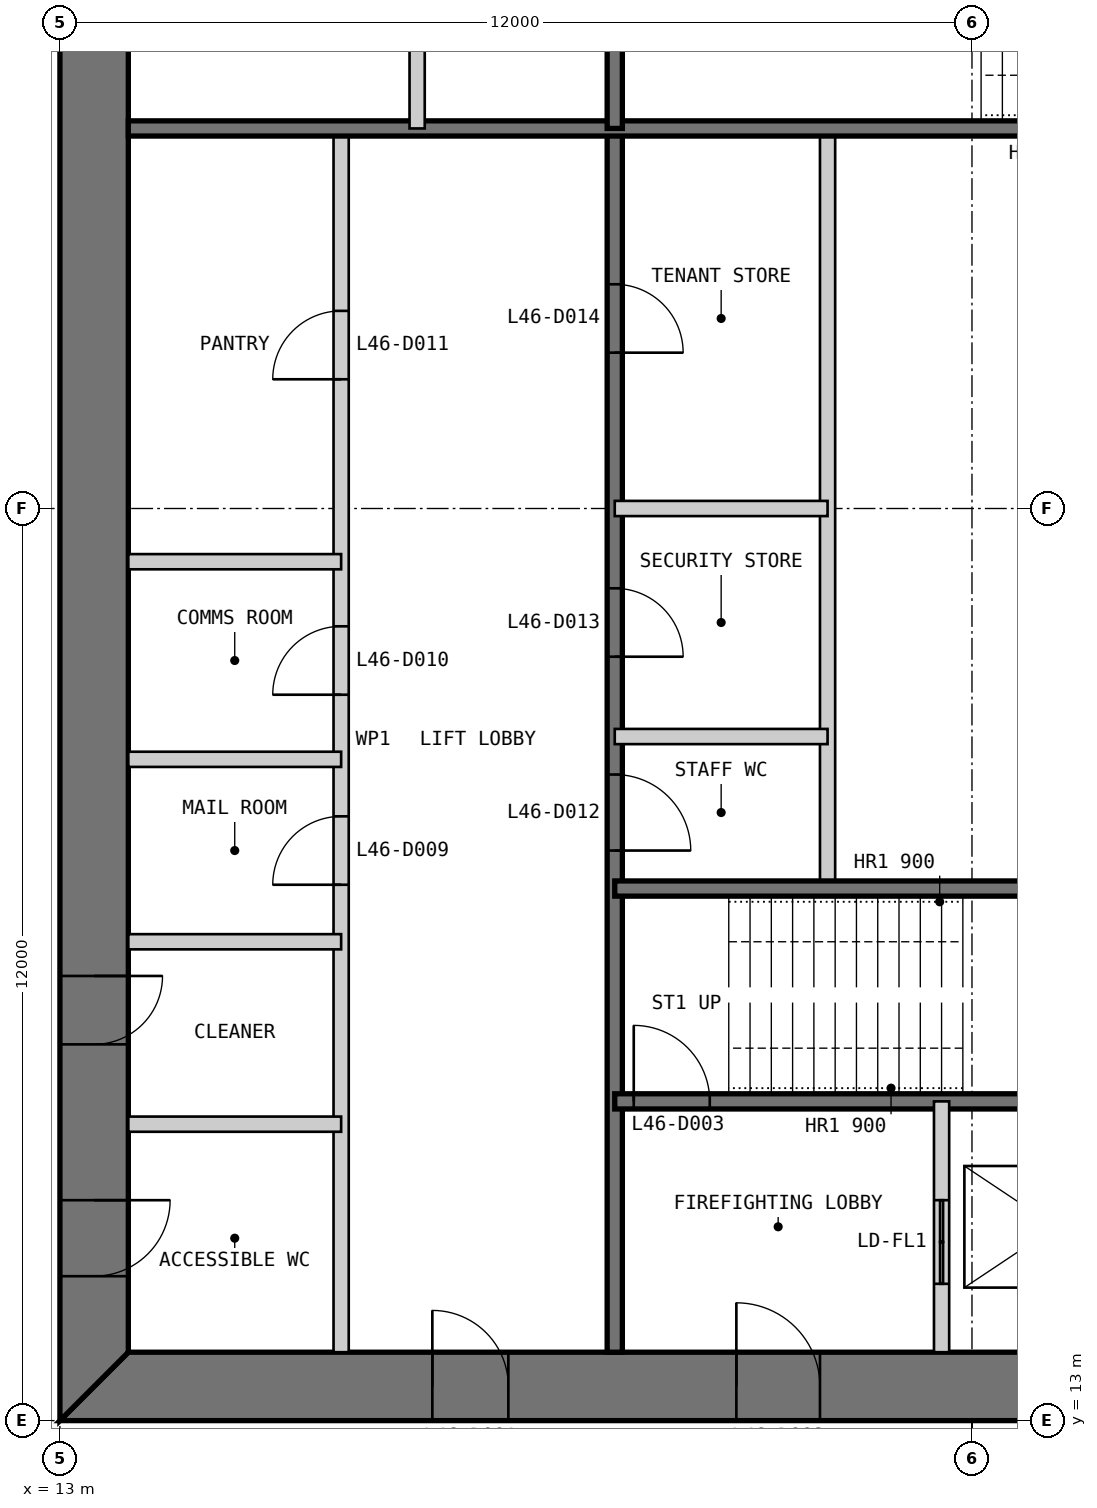
"""IFC4 building model, lengths in metres.
Left out: names, types, materials, properties, quantities, classifications, styles, units other than length and angle.
Written with IfcOpenShell. Run it as: python <this file> out.ifc"""

import sys

from ifc_helpers import new_model, si_unit, direction, frame, frame_2d, origin, place, context, subcontext, project, spatial, polyline, rectangle, outline, extrude, element, fill, save


model = new_model("IFC4")
c1 = context("Model", 3, precision=1e-05, world=origin(), true_north=direction((0.0, 1.0)))
c2 = subcontext(c1, "Body", "Model", "MODEL_VIEW")
j1 = project(units=[si_unit("LENGTHUNIT", "METRE"), si_unit("PLANEANGLEUNIT", "RADIAN")], contexts=[c1])
p1 = place(None, origin())
s1 = spatial("IfcSite", under=j1, at=p1, CompositionType="ELEMENT")
p2 = place(p1, origin())
s2 = spatial("IfcBuilding", under=s1, at=p2, CompositionType="ELEMENT")
p3 = place(p2, frame((0.0, 0.0, 197.8)))
s3 = spatial("IfcBuildingStorey", under=s2, at=p3, CompositionType="ELEMENT", Elevation=197.8)
p4 = place(p3, frame((13.0, 13.45, 0.0), z_axis=(0.0, 0.0, 1.0), x_axis=(1.0, 0.0, 0.0)))
e1 = element("IfcWall", 1, at=p4, inside=s3, PredefinedType="SHEAR", context=c2, shape_type="SweptSolid", body=[
    extrude(outline(polyline([(0.0, -0.45), (24.0, -0.45), (23.1, 0.45), (0.9, 0.45), (0.0, -0.45)])), origin(), (0.0, 0.0, 1.0), 4.0),
])
p5 = place(p4, frame((4.9, 0.0, 0.0)))
e2 = element("IfcOpeningElement", 2, at=p5, cuts=e1, PredefinedType="OPENING", context=c2, shape_type="SweptSolid", body=[
    extrude(rectangle(XDim=1.0, YDim=2.2, at=frame_2d((0.5, 1.1))), frame((0.0, 0.46, 0.0), z_axis=(0.0, -1.0, 0.0), x_axis=(1.0, 0.0, 0.0)), (0.0, 0.0, 1.0), 0.92),
])
p6 = place(p4, frame((8.9, 0.0, 0.0)))
e3 = element("IfcOpeningElement", 3, at=p6, cuts=e1, PredefinedType="OPENING", context=c2, shape_type="SweptSolid", body=[
    extrude(rectangle(XDim=1.1, YDim=2.2, at=frame_2d((0.55, 1.1))), frame((0.0, 0.46, 0.0), z_axis=(0.0, -1.0, 0.0), x_axis=(1.0, 0.0, 0.0)), (0.0, 0.0, 1.0), 0.92),
])
p7 = place(p4, frame((15.05, 0.0, 0.0)))
e4 = element("IfcOpeningElement", 4, at=p7, cuts=e1, PredefinedType="OPENING", context=c2, shape_type="SweptSolid", body=[
    extrude(rectangle(XDim=0.9, YDim=2.2, at=frame_2d((0.45, 1.1))), frame((0.0, 0.46, 0.0), z_axis=(0.0, -1.0, 0.0), x_axis=(1.0, 0.0, 0.0)), (0.0, 0.0, 1.0), 0.92),
])
p8 = place(p4, frame((17.9, 0.0, 0.0)))
e5 = element("IfcOpeningElement", 5, at=p8, cuts=e1, PredefinedType="OPENING", context=c2, shape_type="SweptSolid", body=[
    extrude(rectangle(XDim=1.0, YDim=2.2, at=frame_2d((0.5, 1.1))), frame((0.0, 0.46, 0.0), z_axis=(0.0, -1.0, 0.0), x_axis=(1.0, 0.0, 0.0)), (0.0, 0.0, 1.0), 0.92),
])
p9 = place(p4, frame((21.4, 0.0, 0.0)))
e6 = element("IfcOpeningElement", 6, at=p9, cuts=e1, PredefinedType="OPENING", context=c2, shape_type="SweptSolid", body=[
    extrude(rectangle(XDim=1.0, YDim=2.2, at=frame_2d((0.5, 1.1))), frame((0.0, 0.46, 0.0), z_axis=(0.0, -1.0, 0.0), x_axis=(1.0, 0.0, 0.0)), (0.0, 0.0, 1.0), 0.92),
])
p10 = place(p3, frame((13.45, 36.1, 0.0), z_axis=(0.0, 0.0, 1.0), x_axis=(0.0, -1.0, 0.0)))
e7 = element("IfcWall", 7, at=p10, inside=s3, PredefinedType="SHEAR", context=c2, shape_type="SweptSolid", body=[
    extrude(outline(polyline([(-0.9, -0.45), (23.1, -0.45), (22.2, 0.45), (0.0, 0.45), (-0.9, -0.45)])), origin(), (0.0, 0.0, 1.0), 4.0),
])
p11 = place(p10, frame((20.2, 0.0, 0.0)))
e8 = element("IfcOpeningElement", 8, at=p11, cuts=e7, PredefinedType="OPENING", context=c2, shape_type="SweptSolid", body=[
    extrude(rectangle(XDim=1.0, YDim=2.2, at=frame_2d((0.5, 1.1))), frame((0.0, 0.46, 0.0), z_axis=(0.0, -1.0, 0.0), x_axis=(1.0, 0.0, 0.0)), (0.0, 0.0, 1.0), 0.92),
])
p12 = place(p10, frame((17.25, 0.0, 0.0)))
e9 = element("IfcOpeningElement", 9, at=p12, cuts=e7, PredefinedType="OPENING", context=c2, shape_type="SweptSolid", body=[
    extrude(rectangle(XDim=0.9, YDim=2.2, at=frame_2d((0.45, 1.1))), frame((0.0, 0.46, 0.0), z_axis=(0.0, -1.0, 0.0), x_axis=(1.0, 0.0, 0.0)), (0.0, 0.0, 1.0), 0.92),
])
p13 = place(p3, frame((16.7, 13.9, 0.0), z_axis=(0.0, 0.0, 1.0), x_axis=(0.0, 1.0, 0.0)))
e10 = element("IfcWall", 10, at=p13, inside=s3, PredefinedType="PARTITIONING", context=c2, shape_type="SweptSolid", body=[
    extrude(rectangle(XDim=16.1, YDim=0.2, at=frame_2d((8.05, 0.0))), origin(), (0.0, 0.0, 1.0), 3.8),
])
p14 = place(p13, frame((6.15, 0.0, 0.0)))
e11 = element("IfcOpeningElement", 11, at=p14, cuts=e10, PredefinedType="OPENING", context=c2, shape_type="SweptSolid", body=[
    extrude(rectangle(XDim=0.9, YDim=2.2, at=frame_2d((0.45, 1.1))), frame((0.0, 0.11, 0.0), z_axis=(0.0, -1.0, 0.0), x_axis=(1.0, 0.0, 0.0)), (0.0, 0.0, 1.0), 0.22),
])
p15 = place(p13, frame((8.65, 0.0, 0.0)))
e12 = element("IfcOpeningElement", 12, at=p15, cuts=e10, PredefinedType="OPENING", context=c2, shape_type="SweptSolid", body=[
    extrude(rectangle(XDim=0.9, YDim=2.2, at=frame_2d((0.45, 1.1))), frame((0.0, 0.11, 0.0), z_axis=(0.0, -1.0, 0.0), x_axis=(1.0, 0.0, 0.0)), (0.0, 0.0, 1.0), 0.22),
])
p16 = place(p13, frame((12.8, 0.0, 0.0)))
e13 = element("IfcOpeningElement", 13, at=p16, cuts=e10, PredefinedType="OPENING", context=c2, shape_type="SweptSolid", body=[
    extrude(rectangle(XDim=0.9, YDim=2.2, at=frame_2d((0.45, 1.1))), frame((0.0, 0.11, 0.0), z_axis=(0.0, -1.0, 0.0), x_axis=(1.0, 0.0, 0.0)), (0.0, 0.0, 1.0), 0.22),
])
p17 = place(p3, frame((20.3, 13.9, 0.0), z_axis=(0.0, 0.0, 1.0), x_axis=(0.0, 1.0, 0.0)))
e14 = element("IfcWall", 14, at=p17, inside=s3, PredefinedType="SOLIDWALL", context=c2, shape_type="SweptSolid", body=[
    extrude(rectangle(XDim=16.1, YDim=0.2, at=frame_2d((8.05, 0.0))), origin(), (0.0, 0.0, 1.0), 3.8),
])
p18 = place(p17, frame((6.6, 0.0, 0.0)))
e15 = element("IfcOpeningElement", 15, at=p18, cuts=e14, PredefinedType="OPENING", context=c2, shape_type="SweptSolid", body=[
    extrude(rectangle(XDim=1.0, YDim=2.2, at=frame_2d((0.5, 1.1))), frame((0.0, 0.11, 0.0), z_axis=(0.0, -1.0, 0.0), x_axis=(1.0, 0.0, 0.0)), (0.0, 0.0, 1.0), 0.22),
])
p19 = place(p17, frame((9.15, 0.0, 0.0)))
e16 = element("IfcOpeningElement", 16, at=p19, cuts=e14, PredefinedType="OPENING", context=c2, shape_type="SweptSolid", body=[
    extrude(rectangle(XDim=0.9, YDim=2.2, at=frame_2d((0.45, 1.1))), frame((0.0, 0.11, 0.0), z_axis=(0.0, -1.0, 0.0), x_axis=(1.0, 0.0, 0.0)), (0.0, 0.0, 1.0), 0.22),
])
p20 = place(p17, frame((13.15, 0.0, 0.0)))
e17 = element("IfcOpeningElement", 17, at=p20, cuts=e14, PredefinedType="OPENING", context=c2, shape_type="SweptSolid", body=[
    extrude(rectangle(XDim=0.9, YDim=2.2, at=frame_2d((0.45, 1.1))), frame((0.0, 0.11, 0.0), z_axis=(0.0, -1.0, 0.0), x_axis=(1.0, 0.0, 0.0)), (0.0, 0.0, 1.0), 0.22),
])
p21 = place(p3, frame((23.1, 20.0, 0.0), z_axis=(0.0, 0.0, 1.0), x_axis=(0.0, 1.0, 0.0)))
e18 = element("IfcWall", 18, at=p21, inside=s3, PredefinedType="PARTITIONING", context=c2, shape_type="SweptSolid", body=[
    extrude(rectangle(XDim=10.0, YDim=0.2, at=frame_2d((5.0, 0.0))), origin(), (0.0, 0.0, 1.0), 3.8),
])
p22 = place(p3, frame((20.3, 17.2, 0.0), z_axis=(0.0, 0.0, 1.0), x_axis=(1.0, 0.0, 0.0)))
e19 = element("IfcWall", 19, at=p22, inside=s3, PredefinedType="SOLIDWALL", context=c2, shape_type="SweptSolid", body=[
    extrude(rectangle(XDim=9.4, YDim=0.2, at=frame_2d((4.7, 0.0))), origin(), (0.0, 0.0, 1.0), 3.8),
])
p23 = place(p22, frame((0.25, 0.0, 0.0)))
e20 = element("IfcOpeningElement", 20, at=p23, cuts=e19, PredefinedType="OPENING", context=c2, shape_type="SweptSolid", body=[
    extrude(rectangle(XDim=1.0, YDim=2.2, at=frame_2d((0.5, 1.1))), frame((0.0, 0.11, 0.0), z_axis=(0.0, -1.0, 0.0), x_axis=(1.0, 0.0, 0.0)), (0.0, 0.0, 1.0), 0.22),
])
p24 = place(p3, frame((20.3, 20.0, 0.0), z_axis=(0.0, 0.0, 1.0), x_axis=(1.0, 0.0, 0.0)))
e21 = element("IfcWall", 21, at=p24, inside=s3, PredefinedType="SOLIDWALL", context=c2, shape_type="SweptSolid", body=[
    extrude(rectangle(XDim=15.8, YDim=0.2, at=frame_2d((7.9, 0.0))), origin(), (0.0, 0.0, 1.0), 3.8),
])
p25 = place(p3, frame((24.6, 13.9, 0.0), z_axis=(0.0, 0.0, 1.0), x_axis=(0.0, 1.0, 0.0)))
e22 = element("IfcWall", 22, at=p25, inside=s3, PredefinedType="PARTITIONING", context=c2, shape_type="SweptSolid", body=[
    extrude(rectangle(XDim=3.3, YDim=0.2, at=frame_2d((1.65, 0.0))), origin(), (0.0, 0.0, 1.0), 3.8),
])
p26 = place(p25, frame((0.9, 0.0, 0.0)))
e23 = element("IfcOpeningElement", 23, at=p26, cuts=e22, PredefinedType="OPENING", context=c2, shape_type="SweptSolid", body=[
    extrude(rectangle(XDim=1.1, YDim=2.2, at=frame_2d((0.55, 1.1))), frame((0.0, 0.11, 0.0), z_axis=(0.0, -1.0, 0.0), x_axis=(1.0, 0.0, 0.0)), (0.0, 0.0, 1.0), 0.22),
])
for number, where, z_axis, x_axis in (
    (24, (13.9, 16.9, 0.0), (0.0, 0.0, 1.0), (1.0, 0.0, 0.0)),
    (25, (13.9, 19.3, 0.0), (0.0, 0.0, 1.0), (1.0, 0.0, 0.0)),
    (26, (13.9, 21.7, 0.0), (0.0, 0.0, 1.0), (1.0, 0.0, 0.0)),
    (27, (13.9, 24.3, 0.0), (0.0, 0.0, 1.0), (1.0, 0.0, 0.0)),
    (28, (20.3, 22.0, 0.0), (0.0, 0.0, 1.0), (1.0, 0.0, 0.0)),
    (29, (20.3, 25.0, 0.0), (0.0, 0.0, 1.0), (1.0, 0.0, 0.0)),
):
    element("IfcWall", number, at=place(p3, frame(where, z_axis=z_axis, x_axis=x_axis)), inside=s3, PredefinedType="PARTITIONING", context=c2, shape_type="SweptSolid", body=[
        extrude(rectangle(XDim=2.8, YDim=0.2, at=frame_2d((1.4, 0.0))), origin(), (0.0, 0.0, 1.0), 3.8),
    ])
p27 = place(p3, frame((29.7, 30.0, 0.0), z_axis=(0.0, 0.0, 1.0), x_axis=(-1.0, 0.0, 0.0)))
e30 = element("IfcWall", 30, at=p27, inside=s3, PredefinedType="SOLIDWALL", context=c2, shape_type="SweptSolid", body=[
    extrude(rectangle(XDim=15.8, YDim=0.2, at=frame_2d((7.9, 0.0))), origin(), (0.0, 0.0, 1.0), 3.8),
])
p28 = place(p3, frame((20.3, 36.1, 0.0), z_axis=(0.0, 0.0, 1.0), x_axis=(0.0, -1.0, 0.0)))
e31 = element("IfcWall", 31, at=p28, inside=s3, PredefinedType="SOLIDWALL", context=c2, shape_type="SweptSolid", body=[
    extrude(rectangle(XDim=6.1, YDim=0.2, at=frame_2d((3.05, 0.0))), origin(), (0.0, 0.0, 1.0), 3.8),
])
p29 = place(p3, frame((17.7, 36.1, 0.0), z_axis=(0.0, 0.0, 1.0), x_axis=(0.0, -1.0, 0.0)))
e32 = element("IfcWall", 32, at=p29, inside=s3, PredefinedType="PARTITIONING", context=c2, shape_type="SweptSolid", body=[
    extrude(rectangle(XDim=6.1, YDim=0.2, at=frame_2d((3.05, 0.0))), origin(), (0.0, 0.0, 1.0), 3.8),
])
p30 = place(p5, origin())
e33 = element("IfcDoor", 33, at=p30, inside=s3, OperationType="SINGLE_SWING_LEFT", PredefinedType="DOOR", context=c2, shape_type="SweptSolid", body=[
    extrude(rectangle(XDim=1.0, YDim=2.2, at=frame_2d((0.5, 1.1))), frame((0.0, 0.025, 0.0), z_axis=(0.0, -1.0, 0.0), x_axis=(1.0, 0.0, 0.0)), (0.0, 0.0, 1.0), 0.05),
    extrude(outline(polyline([(0.0, 0.0), (0.04, 0.0), (0.04, 2.16), (0.96, 2.16), (0.96, 0.0), (1.0, 0.0), (1.0, 2.2), (0.0, 2.2), (0.0, 0.0)])), frame((0.0, 0.3, 0.0), z_axis=(0.0, -1.0, 0.0), x_axis=(1.0, 0.0, 0.0)), (0.0, 0.0, 1.0), 0.6),
])
fill(e2, e33)
p31 = place(p6, origin())
e34 = element("IfcDoor", 34, at=p31, inside=s3, OperationType="SINGLE_SWING_LEFT", PredefinedType="DOOR", context=c2, shape_type="SweptSolid", body=[
    extrude(rectangle(XDim=1.1, YDim=2.2, at=frame_2d((0.55, 1.1))), frame((0.0, 0.025, 0.0), z_axis=(0.0, -1.0, 0.0), x_axis=(1.0, 0.0, 0.0)), (0.0, 0.0, 1.0), 0.05),
    extrude(outline(polyline([(0.0, 0.0), (0.04, 0.0), (0.04, 2.16), (1.06, 2.16), (1.06, 0.0), (1.1, 0.0), (1.1, 2.2), (0.0, 2.2), (0.0, 0.0)])), frame((0.0, 0.3, 0.0), z_axis=(0.0, -1.0, 0.0), x_axis=(1.0, 0.0, 0.0)), (0.0, 0.0, 1.0), 0.6),
])
fill(e3, e34)
p32 = place(p23, origin())
e35 = element("IfcDoor", 35, at=p32, inside=s3, OperationType="SINGLE_SWING_LEFT", PredefinedType="DOOR", context=c2, shape_type="SweptSolid", body=[
    extrude(rectangle(XDim=1.0, YDim=2.2, at=frame_2d((0.5, 1.1))), frame((0.0, 0.025, 0.0), z_axis=(0.0, -1.0, 0.0), x_axis=(1.0, 0.0, 0.0)), (0.0, 0.0, 1.0), 0.05),
])
fill(e20, e35)
p33 = place(p11, origin())
e36 = element("IfcDoor", 36, at=p33, inside=s3, OperationType="SINGLE_SWING_LEFT", PredefinedType="DOOR", context=c2, shape_type="SweptSolid", body=[
    extrude(rectangle(XDim=1.0, YDim=2.2, at=frame_2d((0.5, 1.1))), frame((0.0, 0.025, 0.0), z_axis=(0.0, -1.0, 0.0), x_axis=(1.0, 0.0, 0.0)), (0.0, 0.0, 1.0), 0.05),
    extrude(outline(polyline([(0.0, 0.0), (0.04, 0.0), (0.04, 2.16), (0.96, 2.16), (0.96, 0.0), (1.0, 0.0), (1.0, 2.2), (0.0, 2.2), (0.0, 0.0)])), frame((0.0, 0.3, 0.0), z_axis=(0.0, -1.0, 0.0), x_axis=(1.0, 0.0, 0.0)), (0.0, 0.0, 1.0), 0.6),
])
fill(e8, e36)
p34 = place(p12, origin())
e37 = element("IfcDoor", 37, at=p34, inside=s3, OperationType="SINGLE_SWING_LEFT", PredefinedType="DOOR", context=c2, shape_type="SweptSolid", body=[
    extrude(rectangle(XDim=0.9, YDim=2.2, at=frame_2d((0.45, 1.1))), frame((0.0, 0.025, 0.0), z_axis=(0.0, -1.0, 0.0), x_axis=(1.0, 0.0, 0.0)), (0.0, 0.0, 1.0), 0.05),
    extrude(outline(polyline([(0.0, 0.0), (0.04, 0.0), (0.04, 2.16), (0.86, 2.16), (0.86, 0.0), (0.9, 0.0), (0.9, 2.2), (0.0, 2.2), (0.0, 0.0)])), frame((0.0, 0.3, 0.0), z_axis=(0.0, -1.0, 0.0), x_axis=(1.0, 0.0, 0.0)), (0.0, 0.0, 1.0), 0.6),
])
fill(e9, e37)
p35 = place(p14, origin())
e38 = element("IfcDoor", 38, at=p35, inside=s3, OperationType="SINGLE_SWING_LEFT", PredefinedType="DOOR", context=c2, shape_type="SweptSolid", body=[
    extrude(rectangle(XDim=0.9, YDim=2.2, at=frame_2d((0.45, 1.1))), frame((0.0, 0.025, 0.0), z_axis=(0.0, -1.0, 0.0), x_axis=(1.0, 0.0, 0.0)), (0.0, 0.0, 1.0), 0.05),
])
fill(e11, e38)
p36 = place(p15, origin())
e39 = element("IfcDoor", 39, at=p36, inside=s3, OperationType="SINGLE_SWING_LEFT", PredefinedType="DOOR", context=c2, shape_type="SweptSolid", body=[
    extrude(rectangle(XDim=0.9, YDim=2.2, at=frame_2d((0.45, 1.1))), frame((0.0, 0.025, 0.0), z_axis=(0.0, -1.0, 0.0), x_axis=(1.0, 0.0, 0.0)), (0.0, 0.0, 1.0), 0.05),
])
fill(e12, e39)
p37 = place(p16, origin())
e40 = element("IfcDoor", 40, at=p37, inside=s3, OperationType="SINGLE_SWING_LEFT", PredefinedType="DOOR", context=c2, shape_type="SweptSolid", body=[
    extrude(rectangle(XDim=0.9, YDim=2.2, at=frame_2d((0.45, 1.1))), frame((0.0, 0.025, 0.0), z_axis=(0.0, -1.0, 0.0), x_axis=(1.0, 0.0, 0.0)), (0.0, 0.0, 1.0), 0.05),
])
fill(e13, e40)
p38 = place(p18, frame((1.0, 0.0, 0.0), z_axis=(0.0, 0.0, 1.0), x_axis=(-1.0, 0.0, 0.0)))
e41 = element("IfcDoor", 41, at=p38, inside=s3, OperationType="SINGLE_SWING_RIGHT", PredefinedType="DOOR", context=c2, shape_type="SweptSolid", body=[
    extrude(rectangle(XDim=1.0, YDim=2.2, at=frame_2d((0.5, 1.1))), frame((0.0, 0.025, 0.0), z_axis=(0.0, -1.0, 0.0), x_axis=(1.0, 0.0, 0.0)), (0.0, 0.0, 1.0), 0.05),
])
fill(e15, e41)
p39 = place(p19, frame((0.9, 0.0, 0.0), z_axis=(0.0, 0.0, 1.0), x_axis=(-1.0, 0.0, 0.0)))
e42 = element("IfcDoor", 42, at=p39, inside=s3, OperationType="SINGLE_SWING_RIGHT", PredefinedType="DOOR", context=c2, shape_type="SweptSolid", body=[
    extrude(rectangle(XDim=0.9, YDim=2.2, at=frame_2d((0.45, 1.1))), frame((0.0, 0.025, 0.0), z_axis=(0.0, -1.0, 0.0), x_axis=(1.0, 0.0, 0.0)), (0.0, 0.0, 1.0), 0.05),
])
fill(e16, e42)
p40 = place(p20, frame((0.9, 0.0, 0.0), z_axis=(0.0, 0.0, 1.0), x_axis=(-1.0, 0.0, 0.0)))
e43 = element("IfcDoor", 43, at=p40, inside=s3, OperationType="SINGLE_SWING_RIGHT", PredefinedType="DOOR", context=c2, shape_type="SweptSolid", body=[
    extrude(rectangle(XDim=0.9, YDim=2.2, at=frame_2d((0.45, 1.1))), frame((0.0, 0.025, 0.0), z_axis=(0.0, -1.0, 0.0), x_axis=(1.0, 0.0, 0.0)), (0.0, 0.0, 1.0), 0.05),
])
fill(e17, e43)
p41 = place(p26, origin())
e44 = element("IfcDoor", 44, at=p41, inside=s3, OperationType="DOUBLE_DOOR_SLIDING", PredefinedType="DOOR", context=c2, shape_type="SweptSolid", body=[
    extrude(rectangle(XDim=1.1, YDim=2.2, at=frame_2d((0.55, 1.1))), frame((0.0, 0.025, 0.0), z_axis=(0.0, -1.0, 0.0), x_axis=(1.0, 0.0, 0.0)), (0.0, 0.0, 1.0), 0.05),
])
fill(e23, e44)
save(model, sys.argv[1])
